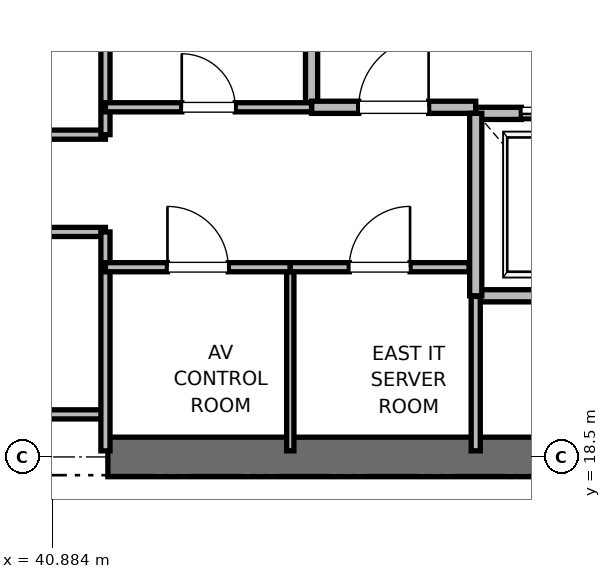
"""IFC4 building model, lengths in metres.
Left out: names, types, materials, properties, quantities, classifications, styles, units other than length and angle.
Written with IfcOpenShell. Run it as: python <this file> out.ifc"""

import sys

from ifc_helpers import new_model, si_unit, direction, frame, frame_2d, origin, place, context, subcontext, project, spatial, rectangle, extrude, element, fill, save


model = new_model("IFC4")
c1 = context("Model", 3, precision=1e-05, world=origin(), true_north=direction((0.0, 1.0)))
c2 = subcontext(c1, "Body", "Model", "MODEL_VIEW")
j1 = project(units=[si_unit("LENGTHUNIT", "METRE"), si_unit("PLANEANGLEUNIT", "RADIAN")], contexts=[c1])
p1 = place(None, origin())
s1 = spatial("IfcSite", under=j1, at=p1, CompositionType="ELEMENT")
p2 = place(p1, origin())
s2 = spatial("IfcBuilding", under=s1, at=p2, CompositionType="ELEMENT")
p3 = place(p2, frame((0.0, 0.0, 83.6)))
s3 = spatial("IfcBuildingStorey", under=s2, at=p3, CompositionType="ELEMENT", Elevation=83.6)
p4 = place(p3, frame((41.8, 18.5, 0.0), z_axis=(0.0, 0.0, 1.0), x_axis=(1.0, 0.0, 0.0)))
e1 = element("IfcWall", 1, at=p4, inside=s3, PredefinedType="SHEAR", context=c2, shape_type="SweptSolid", body=[
    extrude(rectangle(XDim=9.2, YDim=0.65, at=frame_2d((4.6, 0.0))), origin(), (0.0, 0.0, 1.0), 3.76),
])
p5 = place(p3, frame((45.15, 24.25, 0.0), z_axis=(0.0, 0.0, 1.0), x_axis=(0.0, 1.0, 0.0)))
e2 = element("IfcWall", 2, at=p5, inside=s3, PredefinedType="PARTITIONING", context=c2, shape_type="SweptSolid", body=[
    extrude(rectangle(XDim=3.37, YDim=0.2, at=frame_2d((1.685, 0.0))), origin(), (0.0, 0.0, 1.0), 3.76),
])
p6 = place(p3, frame((45.15, 24.25, 0.0), z_axis=(0.0, 0.0, 1.0), x_axis=(1.0, 0.0, 0.0)))
e3 = element("IfcWall", 3, at=p6, inside=s3, PredefinedType="PARTITIONING", context=c2, shape_type="SweptSolid", body=[
    extrude(rectangle(XDim=2.7, YDim=0.2, at=frame_2d((1.35, 0.0))), origin(), (0.0, 0.0, 1.0), 3.76),
])
p7 = place(p6, frame((0.775, 0.0, 0.0)))
e4 = element("IfcOpeningElement", 4, at=p7, cuts=e3, PredefinedType="OPENING", context=c2, shape_type="SweptSolid", body=[
    extrude(rectangle(XDim=1.15, YDim=2.2, at=frame_2d((0.575, 1.1))), frame((0.0, 0.1, 0.0), z_axis=(0.0, -1.0, 0.0), x_axis=(1.0, 0.0, 0.0)), (0.0, 0.0, 1.0), 0.2),
])
p8 = place(p3, frame((47.85, 21.15, 0.0), z_axis=(0.0, 0.0, 1.0), x_axis=(1.0, 0.0, 0.0)))
e5 = element("IfcWall", 5, at=p8, inside=s3, PredefinedType="SOLIDWALL", context=c2, shape_type="SweptSolid", body=[
    extrude(rectangle(XDim=2.6, YDim=0.2, at=frame_2d((1.3, 0.0))), origin(), (0.0, 0.0, 1.0), 3.76),
])
p9 = place(p3, frame((50.45, 24.15, 0.0), z_axis=(0.0, 0.0, 1.0), x_axis=(-1.0, 0.0, 0.0)))
e6 = element("IfcWall", 6, at=p9, inside=s3, PredefinedType="SOLIDWALL", context=c2, shape_type="SweptSolid", body=[
    extrude(rectangle(XDim=2.6, YDim=0.2, at=frame_2d((1.3, 0.0))), origin(), (0.0, 0.0, 1.0), 2.54),
])
p10 = place(p9, frame((0.75, 0.0, 0.0)))
e7 = element("IfcOpeningElement", 7, at=p10, cuts=e6, PredefinedType="OPENING", context=c2, shape_type="SweptSolid", body=[
    extrude(rectangle(XDim=1.1, YDim=2.2, at=frame_2d((0.55, 1.1))), frame((0.0, 0.1, 0.0), z_axis=(0.0, -1.0, 0.0), x_axis=(1.0, 0.0, 0.0)), (0.0, 0.0, 1.0), 0.2),
])
p11 = place(p3, frame((47.85, 24.15, 0.0), z_axis=(0.0, 0.0, 1.0), x_axis=(0.0, -1.0, 0.0)))
e8 = element("IfcWall", 8, at=p11, inside=s3, PredefinedType="SOLIDWALL", context=c2, shape_type="SweptSolid", body=[
    extrude(rectangle(XDim=3.0, YDim=0.2, at=frame_2d((1.5, 0.0))), origin(), (0.0, 0.0, 1.0), 3.76),
])
for number, where, z_axis, x_axis in (
    (9, (39.95, 19.2, 0.0), (0.0, 0.0, 1.0), (1.0, 0.0, 0.0)),
    (10, (39.95, 22.2, 0.0), (0.0, 0.0, 1.0), (1.0, 0.0, 0.0)),
    (11, (39.95, 23.8, 0.0), (0.0, 0.0, 1.0), (1.0, 0.0, 0.0)),
):
    element("IfcWall", number, at=place(p3, frame(where, z_axis=z_axis, x_axis=x_axis)), inside=s3, PredefinedType="PARTITIONING", context=c2, shape_type="SweptSolid", body=[
        extrude(rectangle(XDim=1.81, YDim=0.15, at=frame_2d((0.905, 0.0))), origin(), (0.0, 0.0, 1.0), 2.85),
    ])
p12 = place(p3, frame((41.76, 18.6, 0.0), z_axis=(0.0, 0.0, 1.0), x_axis=(0.0, 1.0, 0.0)))
e12 = element("IfcWall", 12, at=p12, inside=s3, PredefinedType="PARTITIONING", context=c2, shape_type="SweptSolid", body=[
    extrude(rectangle(XDim=3.6, YDim=0.15, at=frame_2d((1.8, 0.0))), origin(), (0.0, 0.0, 1.0), 2.54),
])
p13 = place(p3, frame((41.76, 23.8, 0.0), z_axis=(0.0, 0.0, 1.0), x_axis=(0.0, 1.0, 0.0)))
e13 = element("IfcWall", 13, at=p13, inside=s3, PredefinedType="PARTITIONING", context=c2, shape_type="SweptSolid", body=[
    extrude(rectangle(XDim=4.0, YDim=0.15, at=frame_2d((2.0, 0.0))), origin(), (0.0, 0.0, 1.0), 2.85),
])
p14 = place(p3, frame((47.85, 18.6, 0.0), z_axis=(0.0, 0.0, 1.0), x_axis=(0.0, 1.0, 0.0)))
e14 = element("IfcWall", 14, at=p14, inside=s3, PredefinedType="PARTITIONING", context=c2, shape_type="SweptSolid", body=[
    extrude(rectangle(XDim=2.54, YDim=0.15, at=frame_2d((1.27, 0.0))), origin(), (0.0, 0.0, 1.0), 2.85),
])
p15 = place(p3, frame((44.8, 18.6, 0.0), z_axis=(0.0, 0.0, 1.0), x_axis=(0.0, 1.0, 0.0)))
e15 = element("IfcWall", 15, at=p15, inside=s3, PredefinedType="PARTITIONING", context=c2, shape_type="SweptSolid", body=[
    extrude(rectangle(XDim=3.02, YDim=0.12, at=frame_2d((1.51, 0.0))), origin(), (0.0, 0.0, 1.0), 2.85),
])
p16 = place(p3, frame((41.76, 21.62, 0.0), z_axis=(0.0, 0.0, 1.0), x_axis=(1.0, 0.0, 0.0)))
e16 = element("IfcWall", 16, at=p16, inside=s3, PredefinedType="PARTITIONING", context=c2, shape_type="SweptSolid", body=[
    extrude(rectangle(XDim=3.04, YDim=0.15, at=frame_2d((1.52, 0.0))), origin(), (0.0, 0.0, 1.0), 2.85),
])
p17 = place(p16, frame((1.02, 0.0, 0.0)))
e17 = element("IfcOpeningElement", 17, at=p17, cuts=e16, PredefinedType="OPENING", context=c2, shape_type="SweptSolid", body=[
    extrude(rectangle(XDim=1.0, YDim=2.15, at=frame_2d((0.5, 1.075))), frame((0.0, 0.075, 0.0), z_axis=(0.0, -1.0, 0.0), x_axis=(1.0, 0.0, 0.0)), (0.0, 0.0, 1.0), 0.15),
])
p18 = place(p3, frame((44.8, 21.62, 0.0), z_axis=(0.0, 0.0, 1.0), x_axis=(1.0, 0.0, 0.0)))
e18 = element("IfcWall", 18, at=p18, inside=s3, PredefinedType="PARTITIONING", context=c2, shape_type="SweptSolid", body=[
    extrude(rectangle(XDim=2.94, YDim=0.15, at=frame_2d((1.47, 0.0))), origin(), (0.0, 0.0, 1.0), 2.85),
])
p19 = place(p18, frame((0.97, 0.0, 0.0)))
e19 = element("IfcOpeningElement", 19, at=p19, cuts=e18, PredefinedType="OPENING", context=c2, shape_type="SweptSolid", body=[
    extrude(rectangle(XDim=1.0, YDim=2.15, at=frame_2d((0.5, 1.075))), frame((0.0, 0.075, 0.0), z_axis=(0.0, -1.0, 0.0), x_axis=(1.0, 0.0, 0.0)), (0.0, 0.0, 1.0), 0.15),
])
p20 = place(p3, frame((41.76, 24.25, 0.0), z_axis=(0.0, 0.0, 1.0), x_axis=(1.0, 0.0, 0.0)))
e20 = element("IfcWall", 20, at=p20, inside=s3, PredefinedType="PARTITIONING", context=c2, shape_type="SweptSolid", body=[
    extrude(rectangle(XDim=3.39, YDim=0.15, at=frame_2d((1.695, 0.0))), origin(), (0.0, 0.0, 1.0), 2.85),
])
p21 = place(p20, frame((1.255, 0.0, 0.0)))
e21 = element("IfcOpeningElement", 21, at=p21, cuts=e20, PredefinedType="OPENING", context=c2, shape_type="SweptSolid", body=[
    extrude(rectangle(XDim=0.88, YDim=2.1, at=frame_2d((0.44, 1.05))), frame((0.0, 0.075, 0.0), z_axis=(0.0, -1.0, 0.0), x_axis=(1.0, 0.0, 0.0)), (0.0, 0.0, 1.0), 0.15),
])
p22 = place(p7, origin())
e22 = element("IfcDoor", 22, at=p22, inside=s3, OperationType="SINGLE_SWING_RIGHT", PredefinedType="DOOR", context=c2, shape_type="SweptSolid", body=[
    extrude(rectangle(XDim=1.15, YDim=2.2, at=frame_2d((0.575, 1.1))), frame((0.0, 0.025, 0.0), z_axis=(0.0, -1.0, 0.0), x_axis=(1.0, 0.0, 0.0)), (0.0, 0.0, 1.0), 0.05),
])
fill(e4, e22)
p23 = place(p10, origin())
e23 = element("IfcDoor", 23, at=p23, inside=s3, OperationType="SLIDING_TO_RIGHT", PredefinedType="DOOR", context=c2, shape_type="SweptSolid", body=[
    extrude(rectangle(XDim=1.1, YDim=2.2, at=frame_2d((0.55, 1.1))), frame((0.0, 0.025, 0.0), z_axis=(0.0, -1.0, 0.0), x_axis=(1.0, 0.0, 0.0)), (0.0, 0.0, 1.0), 0.05),
])
fill(e7, e23)
p24 = place(p17, origin())
e24 = element("IfcDoor", 24, at=p24, inside=s3, OperationType="SINGLE_SWING_LEFT", PredefinedType="DOOR", context=c2, shape_type="SweptSolid", body=[
    extrude(rectangle(XDim=1.0, YDim=2.15, at=frame_2d((0.5, 1.075))), frame((0.0, 0.025, 0.0), z_axis=(0.0, -1.0, 0.0), x_axis=(1.0, 0.0, 0.0)), (0.0, 0.0, 1.0), 0.05),
])
fill(e17, e24)
p25 = place(p19, origin())
e25 = element("IfcDoor", 25, at=p25, inside=s3, OperationType="SINGLE_SWING_RIGHT", PredefinedType="DOOR", context=c2, shape_type="SweptSolid", body=[
    extrude(rectangle(XDim=1.0, YDim=2.15, at=frame_2d((0.5, 1.075))), frame((0.0, 0.025, 0.0), z_axis=(0.0, -1.0, 0.0), x_axis=(1.0, 0.0, 0.0)), (0.0, 0.0, 1.0), 0.05),
])
fill(e19, e25)
p26 = place(p21, origin())
e26 = element("IfcDoor", 26, at=p26, inside=s3, OperationType="SINGLE_SWING_LEFT", PredefinedType="DOOR", context=c2, shape_type="SweptSolid", body=[
    extrude(rectangle(XDim=0.88, YDim=2.1, at=frame_2d((0.44, 1.05))), frame((0.0, 0.025, 0.0), z_axis=(0.0, -1.0, 0.0), x_axis=(1.0, 0.0, 0.0)), (0.0, 0.0, 1.0), 0.05),
])
fill(e21, e26)
save(model, sys.argv[1])
